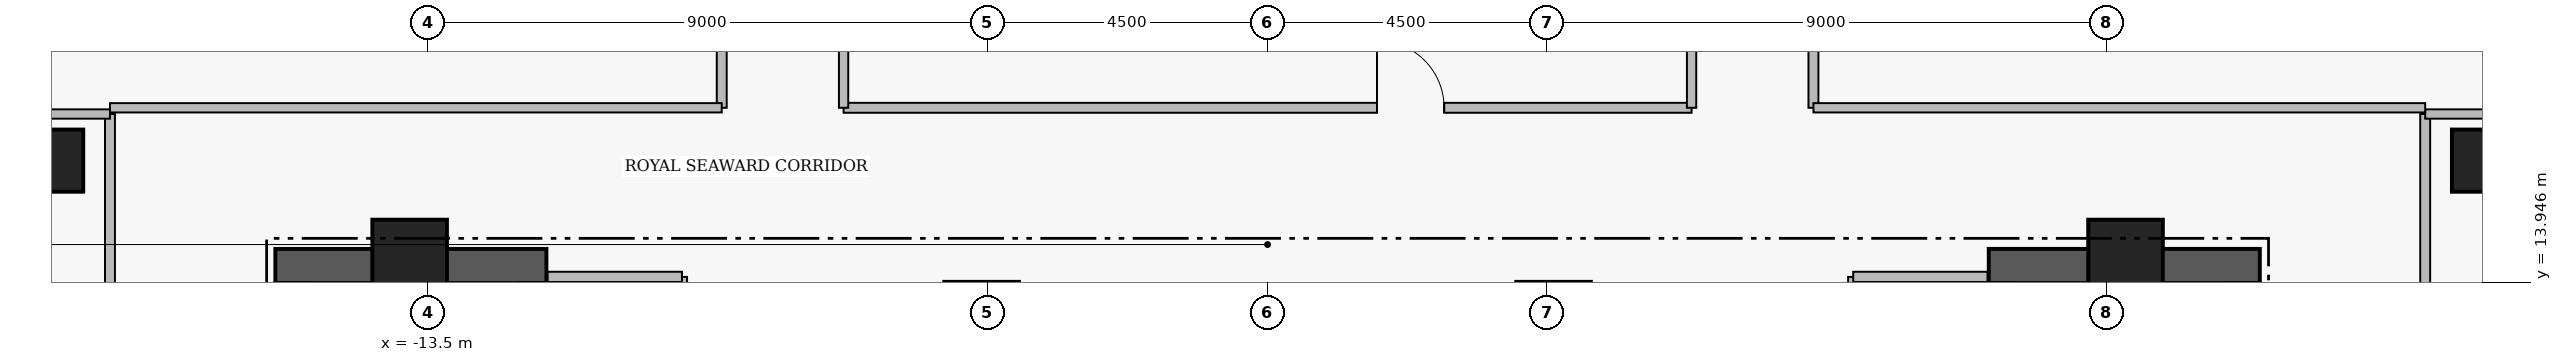
"""IFC4 building model, lengths in metres.
Left out: names, types, materials, properties, quantities, classifications, styles, units other than length and angle.
Written with IfcOpenShell. Run it as: python <this file> out.ifc"""

import sys

from ifc_helpers import new_model, si_unit, direction, frame, frame_2d, origin, origin_2d, place, context, subcontext, project, spatial, rectangle, extrude, element, fill, save


model = new_model("IFC4")
c1 = context("Model", 3, precision=1e-05, world=origin(), true_north=direction((0.0, 1.0)))
c2 = subcontext(c1, "Body", "Model", "MODEL_VIEW")
j1 = project(units=[si_unit("LENGTHUNIT", "METRE"), si_unit("PLANEANGLEUNIT", "RADIAN")], contexts=[c1])
p1 = place(None, origin())
s1 = spatial("IfcSite", under=j1, at=p1, CompositionType="ELEMENT")
p2 = place(p1, origin())
s2 = spatial("IfcBuilding", under=s1, at=p2, CompositionType="ELEMENT")
p3 = place(p2, frame((0.0, 0.0, 292.85)))
s3 = spatial("IfcBuildingStorey", under=s2, at=p3, CompositionType="ELEMENT", Elevation=292.85)
for number, where, z_axis, x_axis in (
    (1, (-15.96, 14.205, 0.0), (0.0, 0.0, 1.0), (1.0, 0.0, 0.0)),
    (2, (11.6, 14.205, 0.0), (0.0, 0.0, 1.0), (1.0, 0.0, 0.0)),
):
    element("IfcWall", number, at=place(p3, frame(where, z_axis=z_axis, x_axis=x_axis)), inside=s3, PredefinedType="SHEAR", context=c2, shape_type="SweptSolid", body=[
        extrude(rectangle(XDim=4.36, YDim=0.55, at=frame_2d((2.18, 0.0))), origin(), (0.0, 0.0, 1.0), 4.21),
    ])
for number, where, z_axis, x_axis in (
    (3, (-13.8, 14.35, 0.0), (0.0, 0.0, 1.0), (1.0, 0.0, 0.0)),
    (4, (-4.6, 13.35, 0.0), (0.0, 0.0, 1.0), (1.0, 0.0, 0.0)),
    (5, (4.6, 13.35, 0.0), (0.0, 0.0, 1.0), (1.0, 0.0, 0.0)),
    (6, (13.8, 14.35, 0.0), (0.0, 0.0, 1.0), (1.0, 0.0, 0.0)),
):
    element("IfcColumn", number, at=place(p3, frame(where, z_axis=z_axis, x_axis=x_axis)), inside=s3, PredefinedType="COLUMN", context=c2, shape_type="SweptSolid", body=[
        extrude(rectangle(XDim=1.2, YDim=1.2, at=origin_2d()), origin(), (0.0, 0.0, 1.0), 4.4),
    ])
for number, where, z_axis, x_axis in (
    (7, (-19.55, 15.9, 0.0), (0.0, 0.0, 1.0), (1.0, 0.0, 0.0)),
    (8, (19.55, 15.9, 0.0), (0.0, 0.0, 1.0), (1.0, 0.0, 0.0)),
):
    element("IfcColumn", number, at=place(p3, frame(where, z_axis=z_axis, x_axis=x_axis)), inside=s3, PredefinedType="COLUMN", context=c2, shape_type="SweptSolid", body=[
        extrude(rectangle(XDim=1.0, YDim=1.0, at=origin_2d()), origin(), (0.0, 0.0, 1.0), 4.4),
    ])
p4 = place(p3, frame((-18.62, 4.48, 0.0), z_axis=(0.0, 0.0, 1.0), x_axis=(0.0, 1.0, 0.0)))
e9 = element("IfcWall", 9, at=p4, inside=s3, PredefinedType="PARTITIONING", context=c2, shape_type="SweptSolid", body=[
    extrude(rectangle(XDim=12.17, YDim=0.16, at=frame_2d((6.085, 0.0))), origin(), (0.0, 0.0, 1.0), 4.16),
])
p5 = place(p4, frame((5.625, 0.0, 0.0)))
e10 = element("IfcOpeningElement", 10, at=p5, cuts=e9, PredefinedType="OPENING", context=c2, shape_type="SweptSolid", body=[
    extrude(rectangle(XDim=0.92, YDim=2.12, at=frame_2d((0.46, 1.06))), frame((0.0, 0.09, 0.0), z_axis=(0.0, -1.0, 0.0), x_axis=(1.0, 0.0, 0.0)), (0.0, 0.0, 1.0), 0.18),
])
p6 = place(p3, frame((18.62, 4.48, 0.0), z_axis=(0.0, 0.0, 1.0), x_axis=(0.0, 1.0, 0.0)))
e11 = element("IfcWall", 11, at=p6, inside=s3, PredefinedType="PARTITIONING", context=c2, shape_type="SweptSolid", body=[
    extrude(rectangle(XDim=12.17, YDim=0.16, at=frame_2d((6.085, 0.0))), origin(), (0.0, 0.0, 1.0), 4.16),
])
p7 = place(p6, frame((5.625, 0.0, 0.0)))
e12 = element("IfcOpeningElement", 12, at=p7, cuts=e11, PredefinedType="OPENING", context=c2, shape_type="SweptSolid", body=[
    extrude(rectangle(XDim=0.92, YDim=2.12, at=frame_2d((0.46, 1.06))), frame((0.0, 0.09, 0.0), z_axis=(0.0, -1.0, 0.0), x_axis=(1.0, 0.0, 0.0)), (0.0, 0.0, 1.0), 0.18),
])
p8 = place(p3, frame((-6.82, 16.75, 0.0), z_axis=(0.0, 0.0, 1.0), x_axis=(1.0, 0.0, 0.0)))
e13 = element("IfcWall", 13, at=p8, inside=s3, PredefinedType="PARTITIONING", context=c2, shape_type="SweptSolid", body=[
    extrude(rectangle(XDim=13.64, YDim=0.16, at=frame_2d((6.82, 0.0))), origin(), (0.0, 0.0, 1.0), 4.16),
])
p9 = place(p8, frame((8.58, 0.0, 0.0)))
e14 = element("IfcOpeningElement", 14, at=p9, cuts=e13, PredefinedType="OPENING", context=c2, shape_type="SweptSolid", body=[
    extrude(rectangle(XDim=1.08, YDim=2.18, at=frame_2d((0.54, 1.09))), frame((0.0, 0.09, 0.0), z_axis=(0.0, -1.0, 0.0), x_axis=(1.0, 0.0, 0.0)), (0.0, 0.0, 1.0), 0.18),
])
p10 = place(p3, frame((-8.78, 16.75, 0.0), z_axis=(0.0, 0.0, 1.0), x_axis=(0.0, 1.0, 0.0)))
e15 = element("IfcWall", 15, at=p10, inside=s3, PredefinedType="PARTITIONING", context=c2, shape_type="SweptSolid", body=[
    extrude(rectangle(XDim=6.85, YDim=0.16, at=frame_2d((3.425, 0.0))), origin(), (0.0, 0.0, 1.0), 4.16),
])
p11 = place(p10, frame((2.885, 0.0, 0.0)))
e16 = element("IfcOpeningElement", 16, at=p11, cuts=e15, PredefinedType="OPENING", context=c2, shape_type="SweptSolid", body=[
    extrude(rectangle(XDim=1.08, YDim=2.18, at=frame_2d((0.54, 1.09))), frame((0.0, 0.09, 0.0), z_axis=(0.0, -1.0, 0.0), x_axis=(1.0, 0.0, 0.0)), (0.0, 0.0, 1.0), 0.18),
])
p12 = place(p3, frame((8.78, 16.75, 0.0), z_axis=(0.0, 0.0, 1.0), x_axis=(0.0, 1.0, 0.0)))
e17 = element("IfcWall", 17, at=p12, inside=s3, PredefinedType="PARTITIONING", context=c2, shape_type="SweptSolid", body=[
    extrude(rectangle(XDim=6.85, YDim=0.16, at=frame_2d((3.425, 0.0))), origin(), (0.0, 0.0, 1.0), 4.16),
])
p13 = place(p12, frame((2.885, 0.0, 0.0)))
e18 = element("IfcOpeningElement", 18, at=p13, cuts=e17, PredefinedType="OPENING", context=c2, shape_type="SweptSolid", body=[
    extrude(rectangle(XDim=1.08, YDim=2.18, at=frame_2d((0.54, 1.09))), frame((0.0, 0.09, 0.0), z_axis=(0.0, -1.0, 0.0), x_axis=(1.0, 0.0, 0.0)), (0.0, 0.0, 1.0), 0.18),
])
p14 = place(p3, frame((-9.42, 11.07, 0.0), z_axis=(0.0, 0.0, 1.0), x_axis=(0.0, 1.0, 0.0)))
e19 = element("IfcWall", 19, at=p14, inside=s3, PredefinedType="PARTITIONING", context=c2, shape_type="SweptSolid", body=[
    extrude(rectangle(XDim=2.96, YDim=0.165, at=frame_2d((1.48, 0.0))), origin(), (0.0, 0.0, 1.0), 4.16),
])
p15 = place(p3, frame((-11.58, 14.03, 0.0), z_axis=(0.0, 0.0, 1.0), x_axis=(1.0, 0.0, 0.0)))
e20 = element("IfcWall", 20, at=p15, inside=s3, PredefinedType="PARTITIONING", context=c2, shape_type="SweptSolid", body=[
    extrude(rectangle(XDim=2.16, YDim=0.165, at=frame_2d((1.08, 0.0))), origin(), (0.0, 0.0, 1.0), 4.16),
])
p16 = place(p3, frame((9.42, 11.07, 0.0), z_axis=(0.0, 0.0, 1.0), x_axis=(0.0, 1.0, 0.0)))
e21 = element("IfcWall", 21, at=p16, inside=s3, PredefinedType="PARTITIONING", context=c2, shape_type="SweptSolid", body=[
    extrude(rectangle(XDim=2.96, YDim=0.165, at=frame_2d((1.48, 0.0))), origin(), (0.0, 0.0, 1.0), 4.16),
])
p17 = place(p3, frame((9.42, 14.03, 0.0), z_axis=(0.0, 0.0, 1.0), x_axis=(1.0, 0.0, 0.0)))
e22 = element("IfcWall", 22, at=p17, inside=s3, PredefinedType="PARTITIONING", context=c2, shape_type="SweptSolid", body=[
    extrude(rectangle(XDim=2.16, YDim=0.165, at=frame_2d((1.08, 0.0))), origin(), (0.0, 0.0, 1.0), 4.16),
])
for number, where, z_axis, x_axis in (
    (23, (-21.091, 16.65, 0.0), (0.0, 0.0, 1.0), (1.0, 0.0, 0.0)),
    (24, (18.62, 16.65, 0.0), (0.0, 0.0, 1.0), (1.0, 0.0, 0.0)),
):
    element("IfcWall", number, at=place(p3, frame(where, z_axis=z_axis, x_axis=x_axis)), inside=s3, PredefinedType="PARTITIONING", context=c2, shape_type="SweptSolid", body=[
        extrude(rectangle(XDim=2.471, YDim=0.15, at=frame_2d((1.235, 0.0))), origin(), (0.0, 0.0, 1.0), 4.16),
    ])
for number, where, z_axis, x_axis in (
    (25, (-6.82, 16.75, 0.0), (0.0, 0.0, 1.0), (0.0, 1.0, 0.0)),
    (26, (6.82, 16.75, 0.0), (0.0, 0.0, 1.0), (0.0, 1.0, 0.0)),
):
    element("IfcWall", number, at=place(p3, frame(where, z_axis=z_axis, x_axis=x_axis)), inside=s3, PredefinedType="PARTITIONING", context=c2, shape_type="SweptSolid", body=[
        extrude(rectangle(XDim=8.05, YDim=0.15, at=frame_2d((4.025, 0.0))), origin(), (0.0, 0.0, 1.0), 4.16),
    ])
for number, where, z_axis, x_axis in (
    (27, (-18.62, 16.75, 0.0), (0.0, 0.0, 1.0), (1.0, 0.0, 0.0)),
    (28, (8.78, 16.75, 0.0), (0.0, 0.0, 1.0), (1.0, 0.0, 0.0)),
):
    element("IfcWall", number, at=place(p3, frame(where, z_axis=z_axis, x_axis=x_axis)), inside=s3, PredefinedType="PARTITIONING", context=c2, shape_type="SweptSolid", body=[
        extrude(rectangle(XDim=9.84, YDim=0.15, at=frame_2d((4.92, 0.0))), origin(), (0.0, 0.0, 1.0), 4.16),
    ])
p18 = place(p9, origin())
e29 = element("IfcDoor", 29, at=p18, inside=s3, OperationType="SINGLE_SWING_LEFT", PredefinedType="DOOR", context=c2, shape_type="SweptSolid", body=[
    extrude(rectangle(XDim=1.08, YDim=2.18, at=frame_2d((0.54, 1.09))), frame((0.0, 0.025, 0.0), z_axis=(0.0, -1.0, 0.0), x_axis=(1.0, 0.0, 0.0)), (0.0, 0.0, 1.0), 0.05),
])
fill(e14, e29)
save(model, sys.argv[1])
